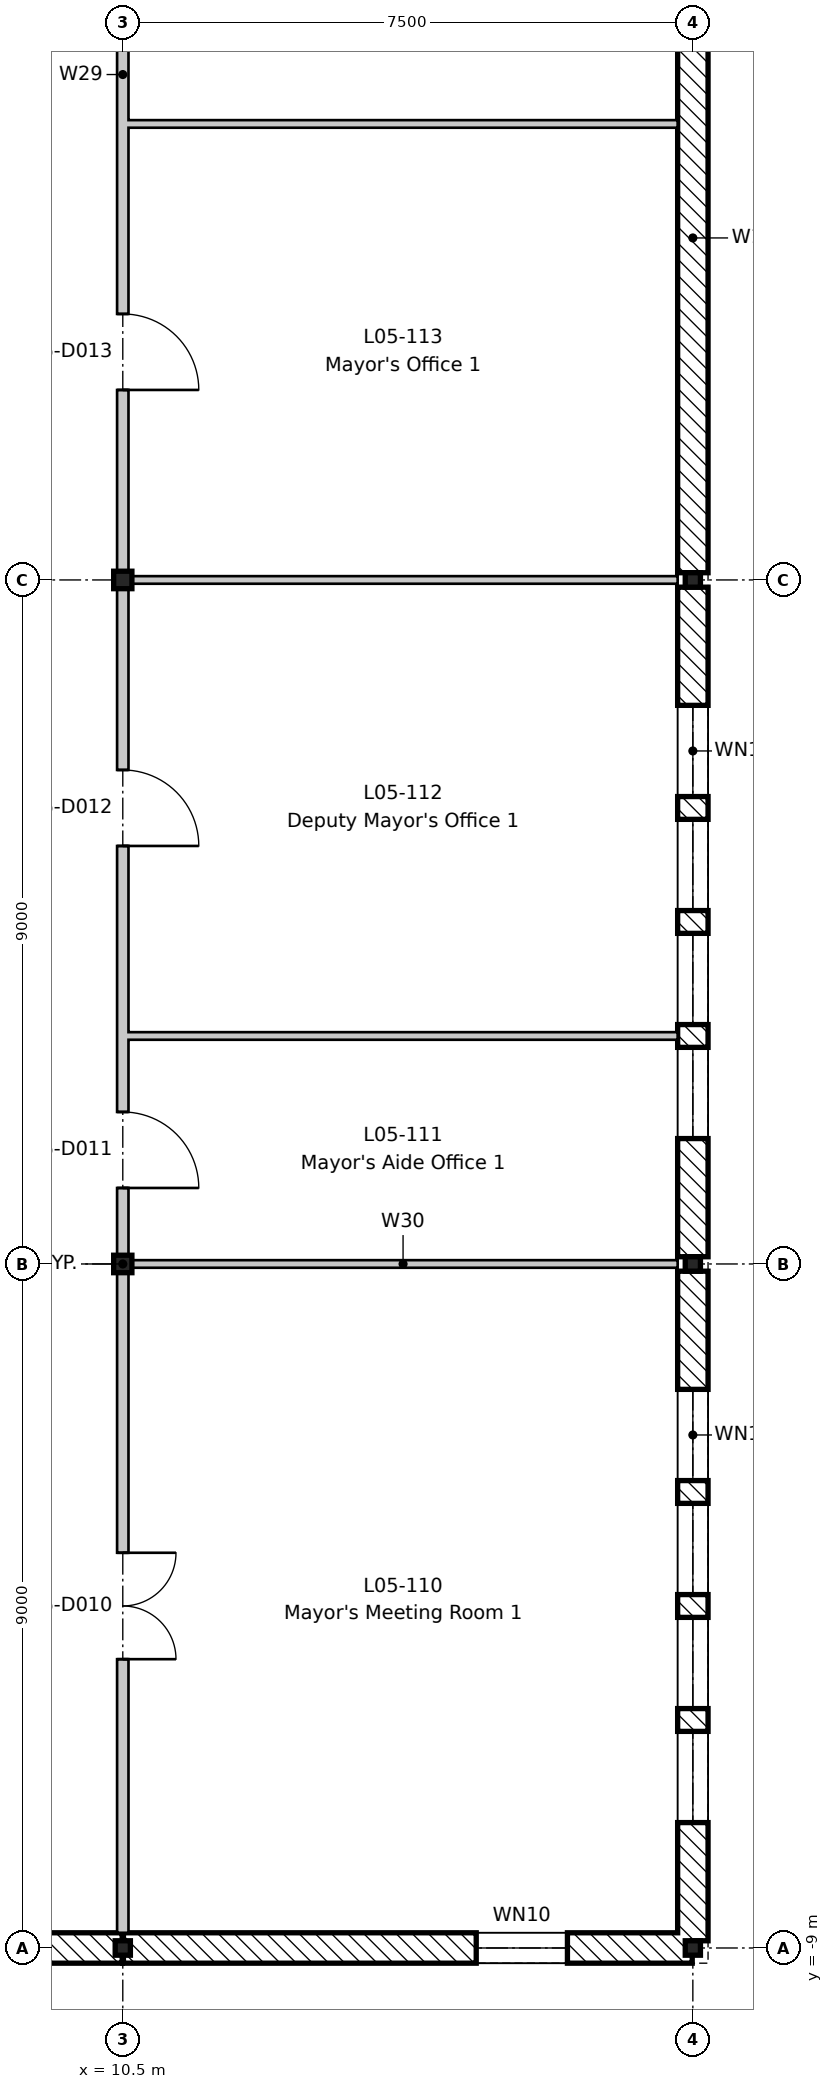
"""IFC4 building model, lengths in metres.
Left out: names, types, materials, properties, quantities, classifications, styles, units other than length and angle.
Written with IfcOpenShell. Run it as: python <this file> out.ifc"""

import sys

from ifc_helpers import new_model, si_unit, direction, frame, frame_2d, origin, origin_2d, place, context, subcontext, project, spatial, rectangle, i_section, extrude, element, fill, save


model = new_model("IFC4")
c1 = context("Model", 3, precision=1e-05, world=origin(), true_north=direction((0.0, 1.0)))
c2 = subcontext(c1, "Body", "Model", "MODEL_VIEW")
j1 = project(units=[si_unit("LENGTHUNIT", "METRE"), si_unit("PLANEANGLEUNIT", "RADIAN")], contexts=[c1])
p1 = place(None, origin())
s1 = spatial("IfcSite", under=j1, at=p1, CompositionType="ELEMENT")
p2 = place(p1, origin())
s2 = spatial("IfcBuilding", under=s1, at=p2, CompositionType="ELEMENT")
p3 = place(p2, frame((0.0, 0.0, 22.8)))
s3 = spatial("IfcBuildingStorey", under=s2, at=p3, CompositionType="ELEMENT", Elevation=22.8)
p4 = place(p3, frame((10.5, -9.0, -0.2), z_axis=(0.0, 0.0, 1.0), x_axis=(1.0, 0.0, 0.0)))
e1 = element("IfcColumn", 1, at=p4, inside=s3, PredefinedType="COLUMN", context=c2, shape_type="SweptSolid", body=[
    extrude(i_section(OverallWidth=0.2, OverallDepth=0.19, WebThickness=0.007, FlangeThickness=0.01, FilletRadius=0.018, at=origin_2d()), origin(), (0.0, 0.0, 1.0), 4.15),
])
for number, where, z_axis, x_axis in (
    (2, (10.5, 0.0, -0.2), (0.0, 0.0, 1.0), (1.0, 0.0, 0.0)),
    (3, (10.5, 9.0, -0.2), (0.0, 0.0, 1.0), (1.0, 0.0, 0.0)),
):
    element("IfcColumn", number, at=place(p3, frame(where, z_axis=z_axis, x_axis=x_axis)), inside=s3, PredefinedType="COLUMN", context=c2, shape_type="SweptSolid", body=[
        extrude(i_section(OverallWidth=0.24, OverallDepth=0.23, WebThickness=0.008, FlangeThickness=0.012, FilletRadius=0.021, at=origin_2d()), origin(), (0.0, 0.0, 1.0), 4.15),
    ])
for number, where, z_axis, x_axis in (
    (4, (18.0, -9.0, -0.2), (0.0, 0.0, 1.0), (1.0, 0.0, 0.0)),
    (5, (18.0, 0.0, -0.2), (0.0, 0.0, 1.0), (1.0, 0.0, 0.0)),
    (6, (18.0, 9.0, -0.2), (0.0, 0.0, 1.0), (1.0, 0.0, 0.0)),
):
    element("IfcColumn", number, at=place(p3, frame(where, z_axis=z_axis, x_axis=x_axis)), inside=s3, PredefinedType="COLUMN", context=c2, shape_type="SweptSolid", body=[
        extrude(i_section(OverallWidth=0.2, OverallDepth=0.19, WebThickness=0.007, FlangeThickness=0.01, FilletRadius=0.018, at=origin_2d()), origin(), (0.0, 0.0, 1.0), 4.15),
    ])
p5 = place(p3, frame((18.0, -0.095, 0.0), z_axis=(0.0, 0.0, 1.0), x_axis=(0.0, -1.0, 0.0)))
e7 = element("IfcWall", 7, at=p5, inside=s3, PredefinedType="STANDARD", context=c2, shape_type="SweptSolid", body=[
    extrude(rectangle(XDim=8.81, YDim=0.4, at=frame_2d((4.405, 0.0))), origin(), (0.0, 0.0, 1.0), 3.55),
])
p6 = place(p5, frame((6.055, 0.0, 0.6)))
e8 = element("IfcOpeningElement", 8, at=p6, cuts=e7, PredefinedType="OPENING", context=c2, shape_type="SweptSolid", body=[
    extrude(rectangle(XDim=1.2, YDim=1.8, at=frame_2d((0.6, 0.9))), frame((0.0, 0.21, 0.0), z_axis=(0.0, -1.0, 0.0), x_axis=(1.0, 0.0, 0.0)), (0.0, 0.0, 1.0), 0.42),
])
p7 = place(p5, frame((4.555, 0.0, 0.6)))
e9 = element("IfcOpeningElement", 9, at=p7, cuts=e7, PredefinedType="OPENING", context=c2, shape_type="SweptSolid", body=[
    extrude(rectangle(XDim=1.2, YDim=1.8, at=frame_2d((0.6, 0.9))), frame((0.0, 0.21, 0.0), z_axis=(0.0, -1.0, 0.0), x_axis=(1.0, 0.0, 0.0)), (0.0, 0.0, 1.0), 0.42),
])
p8 = place(p5, frame((3.055, 0.0, 0.6)))
e10 = element("IfcOpeningElement", 10, at=p8, cuts=e7, PredefinedType="OPENING", context=c2, shape_type="SweptSolid", body=[
    extrude(rectangle(XDim=1.2, YDim=1.8, at=frame_2d((0.6, 0.9))), frame((0.0, 0.21, 0.0), z_axis=(0.0, -1.0, 0.0), x_axis=(1.0, 0.0, 0.0)), (0.0, 0.0, 1.0), 0.42),
])
p9 = place(p5, frame((1.555, 0.0, 0.6)))
e11 = element("IfcOpeningElement", 11, at=p9, cuts=e7, PredefinedType="OPENING", context=c2, shape_type="SweptSolid", body=[
    extrude(rectangle(XDim=1.2, YDim=1.8, at=frame_2d((0.6, 0.9))), frame((0.0, 0.21, 0.0), z_axis=(0.0, -1.0, 0.0), x_axis=(1.0, 0.0, 0.0)), (0.0, 0.0, 1.0), 0.42),
])
p10 = place(p3, frame((18.0, 8.905, 0.0), z_axis=(0.0, 0.0, 1.0), x_axis=(0.0, -1.0, 0.0)))
e12 = element("IfcWall", 12, at=p10, inside=s3, PredefinedType="STANDARD", context=c2, shape_type="SweptSolid", body=[
    extrude(rectangle(XDim=8.81, YDim=0.4, at=frame_2d((4.405, 0.0))), origin(), (0.0, 0.0, 1.0), 3.55),
])
p11 = place(p10, frame((6.055, 0.0, 0.6)))
e13 = element("IfcOpeningElement", 13, at=p11, cuts=e12, PredefinedType="OPENING", context=c2, shape_type="SweptSolid", body=[
    extrude(rectangle(XDim=1.2, YDim=1.8, at=frame_2d((0.6, 0.9))), frame((0.0, 0.21, 0.0), z_axis=(0.0, -1.0, 0.0), x_axis=(1.0, 0.0, 0.0)), (0.0, 0.0, 1.0), 0.42),
])
p12 = place(p10, frame((4.555, 0.0, 0.6)))
e14 = element("IfcOpeningElement", 14, at=p12, cuts=e12, PredefinedType="OPENING", context=c2, shape_type="SweptSolid", body=[
    extrude(rectangle(XDim=1.2, YDim=1.8, at=frame_2d((0.6, 0.9))), frame((0.0, 0.21, 0.0), z_axis=(0.0, -1.0, 0.0), x_axis=(1.0, 0.0, 0.0)), (0.0, 0.0, 1.0), 0.42),
])
p13 = place(p10, frame((3.055, 0.0, 0.6)))
e15 = element("IfcOpeningElement", 15, at=p13, cuts=e12, PredefinedType="OPENING", context=c2, shape_type="SweptSolid", body=[
    extrude(rectangle(XDim=1.2, YDim=1.8, at=frame_2d((0.6, 0.9))), frame((0.0, 0.21, 0.0), z_axis=(0.0, -1.0, 0.0), x_axis=(1.0, 0.0, 0.0)), (0.0, 0.0, 1.0), 0.42),
])
p14 = place(p10, frame((1.555, 0.0, 0.6)))
e16 = element("IfcOpeningElement", 16, at=p14, cuts=e12, PredefinedType="OPENING", context=c2, shape_type="SweptSolid", body=[
    extrude(rectangle(XDim=1.2, YDim=1.8, at=frame_2d((0.6, 0.9))), frame((0.0, 0.21, 0.0), z_axis=(0.0, -1.0, 0.0), x_axis=(1.0, 0.0, 0.0)), (0.0, 0.0, 1.0), 0.42),
])
p15 = place(p3, frame((18.0, 17.905, 0.0), z_axis=(0.0, 0.0, 1.0), x_axis=(0.0, -1.0, 0.0)))
e17 = element("IfcWall", 17, at=p15, inside=s3, PredefinedType="STANDARD", context=c2, shape_type="SweptSolid", body=[
    extrude(rectangle(XDim=8.81, YDim=0.4, at=frame_2d((4.405, 0.0))), origin(), (0.0, 0.0, 1.0), 3.55),
])
p16 = place(p3, frame((10.492, -9.0, 0.0), z_axis=(0.0, 0.0, 1.0), x_axis=(-1.0, 0.0, 0.0)))
e18 = element("IfcWall", 18, at=p16, inside=s3, PredefinedType="STANDARD", context=c2, shape_type="SweptSolid", body=[
    extrude(rectangle(XDim=2.983, YDim=0.4, at=frame_2d((1.492, 0.0))), origin(), (0.0, 0.0, 1.0), 3.75),
])
p17 = place(p3, frame((17.992, -9.0, 0.0), z_axis=(0.0, 0.0, 1.0), x_axis=(-1.0, 0.0, 0.0)))
e19 = element("IfcWall", 19, at=p17, inside=s3, PredefinedType="STANDARD", context=c2, shape_type="SweptSolid", body=[
    extrude(rectangle(XDim=7.483, YDim=0.4, at=frame_2d((3.742, 0.0))), origin(), (0.0, 0.0, 1.0), 3.62),
])
p18 = place(p17, frame((1.642, 0.0, 0.6)))
e20 = element("IfcOpeningElement", 20, at=p18, cuts=e19, PredefinedType="OPENING", context=c2, shape_type="SweptSolid", body=[
    extrude(rectangle(XDim=1.2, YDim=1.8, at=frame_2d((0.6, 0.9))), frame((0.0, 0.21, 0.0), z_axis=(0.0, -1.0, 0.0), x_axis=(1.0, 0.0, 0.0)), (0.0, 0.0, 1.0), 0.42),
])
p19 = place(p3, frame((10.575, 0.0, 0.0), z_axis=(0.0, 0.0, 1.0), x_axis=(1.0, 0.0, 0.0)))
e21 = element("IfcWall", 21, at=p19, inside=s3, PredefinedType="PARTITIONING", context=c2, shape_type="SweptSolid", body=[
    extrude(rectangle(XDim=7.225, YDim=0.1, at=frame_2d((3.613, 0.0))), origin(), (0.0, 0.0, 1.0), 3.6),
])
p20 = place(p3, frame((10.575, 3.0, 0.0), z_axis=(0.0, 0.0, 1.0), x_axis=(1.0, 0.0, 0.0)))
e22 = element("IfcWall", 22, at=p20, inside=s3, PredefinedType="PARTITIONING", context=c2, shape_type="SweptSolid", body=[
    extrude(rectangle(XDim=7.225, YDim=0.1, at=frame_2d((3.613, 0.0))), origin(), (0.0, 0.0, 1.0), 3.95),
])
p21 = place(p3, frame((10.575, 9.0, 0.0), z_axis=(0.0, 0.0, 1.0), x_axis=(1.0, 0.0, 0.0)))
e23 = element("IfcWall", 23, at=p21, inside=s3, PredefinedType="PARTITIONING", context=c2, shape_type="SweptSolid", body=[
    extrude(rectangle(XDim=7.225, YDim=0.1, at=frame_2d((3.613, 0.0))), origin(), (0.0, 0.0, 1.0), 3.6),
])
p22 = place(p3, frame((10.575, 15.0, 0.0), z_axis=(0.0, 0.0, 1.0), x_axis=(1.0, 0.0, 0.0)))
e24 = element("IfcWall", 24, at=p22, inside=s3, PredefinedType="PARTITIONING", context=c2, shape_type="SweptSolid", body=[
    extrude(rectangle(XDim=7.225, YDim=0.1, at=frame_2d((3.613, 0.0))), origin(), (0.0, 0.0, 1.0), 3.95),
])
p23 = place(p3, frame((10.5, -8.8, 0.0), z_axis=(0.0, 0.0, 1.0), x_axis=(0.0, 1.0, 0.0)))
e25 = element("IfcWall", 25, at=p23, inside=s3, PredefinedType="PARTITIONING", context=c2, shape_type="SweptSolid", body=[
    extrude(rectangle(XDim=79.3, YDim=0.15, at=frame_2d((39.65, 0.0))), origin(), (0.0, 0.0, 1.0), 3.43),
])
p24 = place(p23, frame((3.6, 0.0, 0.0)))
e26 = element("IfcOpeningElement", 26, at=p24, cuts=e25, PredefinedType="OPENING", context=c2, shape_type="SweptSolid", body=[
    extrude(rectangle(XDim=1.4, YDim=2.1, at=frame_2d((0.7, 1.05))), frame((0.0, 0.085, 0.0), z_axis=(0.0, -1.0, 0.0), x_axis=(1.0, 0.0, 0.0)), (0.0, 0.0, 1.0), 0.17),
])
p25 = place(p23, frame((9.8, 0.0, 0.0)))
e27 = element("IfcOpeningElement", 27, at=p25, cuts=e25, PredefinedType="OPENING", context=c2, shape_type="SweptSolid", body=[
    extrude(rectangle(XDim=1.0, YDim=2.1, at=frame_2d((0.5, 1.05))), frame((0.0, 0.085, 0.0), z_axis=(0.0, -1.0, 0.0), x_axis=(1.0, 0.0, 0.0)), (0.0, 0.0, 1.0), 0.17),
])
p26 = place(p23, frame((14.3, 0.0, 0.0)))
e28 = element("IfcOpeningElement", 28, at=p26, cuts=e25, PredefinedType="OPENING", context=c2, shape_type="SweptSolid", body=[
    extrude(rectangle(XDim=1.0, YDim=2.1, at=frame_2d((0.5, 1.05))), frame((0.0, 0.085, 0.0), z_axis=(0.0, -1.0, 0.0), x_axis=(1.0, 0.0, 0.0)), (0.0, 0.0, 1.0), 0.17),
])
p27 = place(p23, frame((20.3, 0.0, 0.0)))
e29 = element("IfcOpeningElement", 29, at=p27, cuts=e25, PredefinedType="OPENING", context=c2, shape_type="SweptSolid", body=[
    extrude(rectangle(XDim=1.0, YDim=2.1, at=frame_2d((0.5, 1.05))), frame((0.0, 0.085, 0.0), z_axis=(0.0, -1.0, 0.0), x_axis=(1.0, 0.0, 0.0)), (0.0, 0.0, 1.0), 0.17),
])
p28 = place(p23, frame((27.6, 0.0, 0.0)))
e30 = element("IfcOpeningElement", 30, at=p28, cuts=e25, PredefinedType="OPENING", context=c2, shape_type="SweptSolid", body=[
    extrude(rectangle(XDim=1.4, YDim=2.1, at=frame_2d((0.7, 1.05))), frame((0.0, 0.085, 0.0), z_axis=(0.0, -1.0, 0.0), x_axis=(1.0, 0.0, 0.0)), (0.0, 0.0, 1.0), 0.17),
])
p29 = place(p23, frame((33.8, 0.0, 0.0)))
e31 = element("IfcOpeningElement", 31, at=p29, cuts=e25, PredefinedType="OPENING", context=c2, shape_type="SweptSolid", body=[
    extrude(rectangle(XDim=1.0, YDim=2.1, at=frame_2d((0.5, 1.05))), frame((0.0, 0.085, 0.0), z_axis=(0.0, -1.0, 0.0), x_axis=(1.0, 0.0, 0.0)), (0.0, 0.0, 1.0), 0.17),
])
p30 = place(p23, frame((36.8, 0.0, 0.0)))
e32 = element("IfcOpeningElement", 32, at=p30, cuts=e25, PredefinedType="OPENING", context=c2, shape_type="SweptSolid", body=[
    extrude(rectangle(XDim=1.0, YDim=2.1, at=frame_2d((0.5, 1.05))), frame((0.0, 0.085, 0.0), z_axis=(0.0, -1.0, 0.0), x_axis=(1.0, 0.0, 0.0)), (0.0, 0.0, 1.0), 0.17),
])
p31 = place(p23, frame((39.8, 0.0, 0.0)))
e33 = element("IfcOpeningElement", 33, at=p31, cuts=e25, PredefinedType="OPENING", context=c2, shape_type="SweptSolid", body=[
    extrude(rectangle(XDim=1.0, YDim=2.1, at=frame_2d((0.5, 1.05))), frame((0.0, 0.085, 0.0), z_axis=(0.0, -1.0, 0.0), x_axis=(1.0, 0.0, 0.0)), (0.0, 0.0, 1.0), 0.17),
])
p32 = place(p23, frame((45.55, 0.0, 0.0)))
e34 = element("IfcOpeningElement", 34, at=p32, cuts=e25, PredefinedType="OPENING", context=c2, shape_type="SweptSolid", body=[
    extrude(rectangle(XDim=1.0, YDim=2.1, at=frame_2d((0.5, 1.05))), frame((0.0, 0.085, 0.0), z_axis=(0.0, -1.0, 0.0), x_axis=(1.0, 0.0, 0.0)), (0.0, 0.0, 1.0), 0.17),
])
p33 = place(p23, frame((48.8, 0.0, 0.0)))
e35 = element("IfcOpeningElement", 35, at=p33, cuts=e25, PredefinedType="OPENING", context=c2, shape_type="SweptSolid", body=[
    extrude(rectangle(XDim=1.0, YDim=2.1, at=frame_2d((0.5, 1.05))), frame((0.0, 0.085, 0.0), z_axis=(0.0, -1.0, 0.0), x_axis=(1.0, 0.0, 0.0)), (0.0, 0.0, 1.0), 0.17),
])
p34 = place(p23, frame((51.8, 0.0, 0.0)))
e36 = element("IfcOpeningElement", 36, at=p34, cuts=e25, PredefinedType="OPENING", context=c2, shape_type="SweptSolid", body=[
    extrude(rectangle(XDim=1.0, YDim=2.1, at=frame_2d((0.5, 1.05))), frame((0.0, 0.085, 0.0), z_axis=(0.0, -1.0, 0.0), x_axis=(1.0, 0.0, 0.0)), (0.0, 0.0, 1.0), 0.17),
])
p35 = place(p23, frame((57.6, 0.0, 0.0)))
e37 = element("IfcOpeningElement", 37, at=p35, cuts=e25, PredefinedType="OPENING", context=c2, shape_type="SweptSolid", body=[
    extrude(rectangle(XDim=1.4, YDim=2.1, at=frame_2d((0.7, 1.05))), frame((0.0, 0.085, 0.0), z_axis=(0.0, -1.0, 0.0), x_axis=(1.0, 0.0, 0.0)), (0.0, 0.0, 1.0), 0.17),
])
p36 = place(p23, frame((65.3, 0.0, 0.0)))
e38 = element("IfcOpeningElement", 38, at=p36, cuts=e25, PredefinedType="OPENING", context=c2, shape_type="SweptSolid", body=[
    extrude(rectangle(XDim=1.0, YDim=2.1, at=frame_2d((0.5, 1.05))), frame((0.0, 0.085, 0.0), z_axis=(0.0, -1.0, 0.0), x_axis=(1.0, 0.0, 0.0)), (0.0, 0.0, 1.0), 0.17),
])
p37 = place(p23, frame((69.8, 0.0, 0.0)))
e39 = element("IfcOpeningElement", 39, at=p37, cuts=e25, PredefinedType="OPENING", context=c2, shape_type="SweptSolid", body=[
    extrude(rectangle(XDim=1.0, YDim=2.1, at=frame_2d((0.5, 1.05))), frame((0.0, 0.085, 0.0), z_axis=(0.0, -1.0, 0.0), x_axis=(1.0, 0.0, 0.0)), (0.0, 0.0, 1.0), 0.17),
])
p38 = place(p23, frame((72.8, 0.0, 0.0)))
e40 = element("IfcOpeningElement", 40, at=p38, cuts=e25, PredefinedType="OPENING", context=c2, shape_type="SweptSolid", body=[
    extrude(rectangle(XDim=1.0, YDim=2.1, at=frame_2d((0.5, 1.05))), frame((0.0, 0.085, 0.0), z_axis=(0.0, -1.0, 0.0), x_axis=(1.0, 0.0, 0.0)), (0.0, 0.0, 1.0), 0.17),
])
p39 = place(p6, origin())
e41 = element("IfcWindow", 41, at=p39, inside=s3, PartitioningType="SINGLE_PANEL", PredefinedType="WINDOW", context=c2, shape_type="SweptSolid", body=[
    extrude(rectangle(XDim=1.2, YDim=1.8, at=frame_2d((0.6, 0.9))), frame((0.0, 0.03, 0.0), z_axis=(0.0, -1.0, 0.0), x_axis=(1.0, 0.0, 0.0)), (0.0, 0.0, 1.0), 0.06),
])
fill(e8, e41)
p40 = place(p7, origin())
e42 = element("IfcWindow", 42, at=p40, inside=s3, PartitioningType="SINGLE_PANEL", PredefinedType="WINDOW", context=c2, shape_type="SweptSolid", body=[
    extrude(rectangle(XDim=1.2, YDim=1.8, at=frame_2d((0.6, 0.9))), frame((0.0, 0.03, 0.0), z_axis=(0.0, -1.0, 0.0), x_axis=(1.0, 0.0, 0.0)), (0.0, 0.0, 1.0), 0.06),
])
fill(e9, e42)
p41 = place(p8, origin())
e43 = element("IfcWindow", 43, at=p41, inside=s3, PartitioningType="SINGLE_PANEL", PredefinedType="WINDOW", context=c2, shape_type="SweptSolid", body=[
    extrude(rectangle(XDim=1.2, YDim=1.8, at=frame_2d((0.6, 0.9))), frame((0.0, 0.03, 0.0), z_axis=(0.0, -1.0, 0.0), x_axis=(1.0, 0.0, 0.0)), (0.0, 0.0, 1.0), 0.06),
])
fill(e10, e43)
p42 = place(p9, origin())
e44 = element("IfcWindow", 44, at=p42, inside=s3, PartitioningType="SINGLE_PANEL", PredefinedType="WINDOW", context=c2, shape_type="SweptSolid", body=[
    extrude(rectangle(XDim=1.2, YDim=1.8, at=frame_2d((0.6, 0.9))), frame((0.0, 0.03, 0.0), z_axis=(0.0, -1.0, 0.0), x_axis=(1.0, 0.0, 0.0)), (0.0, 0.0, 1.0), 0.06),
])
fill(e11, e44)
p43 = place(p11, origin())
e45 = element("IfcWindow", 45, at=p43, inside=s3, PartitioningType="SINGLE_PANEL", PredefinedType="WINDOW", context=c2, shape_type="SweptSolid", body=[
    extrude(rectangle(XDim=1.2, YDim=1.8, at=frame_2d((0.6, 0.9))), frame((0.0, 0.03, 0.0), z_axis=(0.0, -1.0, 0.0), x_axis=(1.0, 0.0, 0.0)), (0.0, 0.0, 1.0), 0.06),
])
fill(e13, e45)
p44 = place(p12, origin())
e46 = element("IfcWindow", 46, at=p44, inside=s3, PartitioningType="SINGLE_PANEL", PredefinedType="WINDOW", context=c2, shape_type="SweptSolid", body=[
    extrude(rectangle(XDim=1.2, YDim=1.8, at=frame_2d((0.6, 0.9))), frame((0.0, 0.03, 0.0), z_axis=(0.0, -1.0, 0.0), x_axis=(1.0, 0.0, 0.0)), (0.0, 0.0, 1.0), 0.06),
])
fill(e14, e46)
p45 = place(p13, origin())
e47 = element("IfcWindow", 47, at=p45, inside=s3, PartitioningType="SINGLE_PANEL", PredefinedType="WINDOW", context=c2, shape_type="SweptSolid", body=[
    extrude(rectangle(XDim=1.2, YDim=1.8, at=frame_2d((0.6, 0.9))), frame((0.0, 0.03, 0.0), z_axis=(0.0, -1.0, 0.0), x_axis=(1.0, 0.0, 0.0)), (0.0, 0.0, 1.0), 0.06),
])
fill(e15, e47)
p46 = place(p14, origin())
e48 = element("IfcWindow", 48, at=p46, inside=s3, PartitioningType="SINGLE_PANEL", PredefinedType="WINDOW", context=c2, shape_type="SweptSolid", body=[
    extrude(rectangle(XDim=1.2, YDim=1.8, at=frame_2d((0.6, 0.9))), frame((0.0, 0.03, 0.0), z_axis=(0.0, -1.0, 0.0), x_axis=(1.0, 0.0, 0.0)), (0.0, 0.0, 1.0), 0.06),
])
fill(e16, e48)
p47 = place(p18, origin())
e49 = element("IfcWindow", 49, at=p47, inside=s3, PartitioningType="SINGLE_PANEL", PredefinedType="WINDOW", context=c2, shape_type="SweptSolid", body=[
    extrude(rectangle(XDim=1.2, YDim=1.8, at=frame_2d((0.6, 0.9))), frame((0.0, 0.03, 0.0), z_axis=(0.0, -1.0, 0.0), x_axis=(1.0, 0.0, 0.0)), (0.0, 0.0, 1.0), 0.06),
])
fill(e20, e49)
p48 = place(p24, frame((1.4, 0.0, 0.0), z_axis=(0.0, 0.0, 1.0), x_axis=(-1.0, 0.0, 0.0)))
e50 = element("IfcDoor", 50, at=p48, inside=s3, OperationType="DOUBLE_DOOR_SINGLE_SWING", PredefinedType="DOOR", context=c2, shape_type="SweptSolid", body=[
    extrude(rectangle(XDim=1.4, YDim=2.1, at=frame_2d((0.7, 1.05))), frame((0.0, 0.025, 0.0), z_axis=(0.0, -1.0, 0.0), x_axis=(1.0, 0.0, 0.0)), (0.0, 0.0, 1.0), 0.05),
])
fill(e26, e50)
p49 = place(p25, frame((1.0, 0.0, 0.0), z_axis=(0.0, 0.0, 1.0), x_axis=(-1.0, 0.0, 0.0)))
e51 = element("IfcDoor", 51, at=p49, inside=s3, OperationType="SINGLE_SWING_RIGHT", PredefinedType="DOOR", context=c2, shape_type="SweptSolid", body=[
    extrude(rectangle(XDim=1.0, YDim=2.1, at=frame_2d((0.5, 1.05))), frame((0.0, 0.025, 0.0), z_axis=(0.0, -1.0, 0.0), x_axis=(1.0, 0.0, 0.0)), (0.0, 0.0, 1.0), 0.05),
])
fill(e27, e51)
p50 = place(p26, frame((1.0, 0.0, 0.0), z_axis=(0.0, 0.0, 1.0), x_axis=(-1.0, 0.0, 0.0)))
e52 = element("IfcDoor", 52, at=p50, inside=s3, OperationType="SINGLE_SWING_RIGHT", PredefinedType="DOOR", context=c2, shape_type="SweptSolid", body=[
    extrude(rectangle(XDim=1.0, YDim=2.1, at=frame_2d((0.5, 1.05))), frame((0.0, 0.025, 0.0), z_axis=(0.0, -1.0, 0.0), x_axis=(1.0, 0.0, 0.0)), (0.0, 0.0, 1.0), 0.05),
])
fill(e28, e52)
p51 = place(p27, frame((1.0, 0.0, 0.0), z_axis=(0.0, 0.0, 1.0), x_axis=(-1.0, 0.0, 0.0)))
e53 = element("IfcDoor", 53, at=p51, inside=s3, OperationType="SINGLE_SWING_RIGHT", PredefinedType="DOOR", context=c2, shape_type="SweptSolid", body=[
    extrude(rectangle(XDim=1.0, YDim=2.1, at=frame_2d((0.5, 1.05))), frame((0.0, 0.025, 0.0), z_axis=(0.0, -1.0, 0.0), x_axis=(1.0, 0.0, 0.0)), (0.0, 0.0, 1.0), 0.05),
])
fill(e29, e53)
save(model, sys.argv[1])
